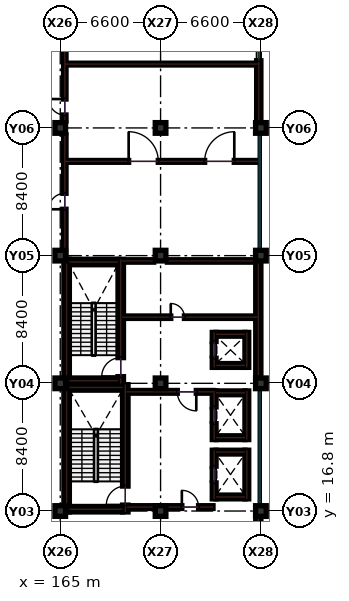
"""IFC4 building model, lengths in metres.
Left out: names, types, materials, properties, quantities, classifications, styles, units other than length and angle.
Written with IfcOpenShell. Run it as: python <this file> out.ifc"""

import sys

from ifc_helpers import new_model, si_unit, direction, frame, frame_2d, origin, origin_2d, place, context, subcontext, project, spatial, rectangle, extrude, element, fill, save


model = new_model("IFC4")
c1 = context("Model", 3, precision=1e-05, world=origin(), true_north=direction((0.0, 1.0)))
c2 = subcontext(c1, "Body", "Model", "MODEL_VIEW")
j1 = project(units=[si_unit("LENGTHUNIT", "METRE"), si_unit("PLANEANGLEUNIT", "RADIAN")], contexts=[c1])
p1 = place(None, origin())
s1 = spatial("IfcSite", under=j1, at=p1, CompositionType="ELEMENT")
p2 = place(p1, origin())
s2 = spatial("IfcBuilding", under=s1, at=p2, CompositionType="ELEMENT")
p3 = place(p2, frame((0.0, 0.0, 22.8)))
s3 = spatial("IfcBuildingStorey", under=s2, at=p3, CompositionType="ELEMENT", Elevation=22.8)
for number, where, z_axis, x_axis in (
    (1, (165.0, 16.8, 0.0), (0.0, 0.0, 1.0), (1.0, 0.0, 0.0)),
    (2, (165.0, 25.2, 0.0), (0.0, 0.0, 1.0), (1.0, 0.0, 0.0)),
    (3, (165.0, 33.6, 0.0), (0.0, 0.0, 1.0), (1.0, 0.0, 0.0)),
    (4, (165.0, 42.0, 0.0), (0.0, 0.0, 1.0), (1.0, 0.0, 0.0)),
    (5, (171.6, 16.8, 0.0), (0.0, 0.0, 1.0), (1.0, 0.0, 0.0)),
    (6, (171.6, 25.2, 0.0), (0.0, 0.0, 1.0), (1.0, 0.0, 0.0)),
    (7, (171.6, 33.6, 0.0), (0.0, 0.0, 1.0), (1.0, 0.0, 0.0)),
    (8, (171.6, 42.0, 0.0), (0.0, 0.0, 1.0), (1.0, 0.0, 0.0)),
    (9, (178.2, 16.8, 0.0), (0.0, 0.0, 1.0), (1.0, 0.0, 0.0)),
    (10, (178.2, 25.2, 0.0), (0.0, 0.0, 1.0), (1.0, 0.0, 0.0)),
    (11, (178.2, 33.6, 0.0), (0.0, 0.0, 1.0), (1.0, 0.0, 0.0)),
    (12, (178.2, 42.0, 0.0), (0.0, 0.0, 1.0), (1.0, 0.0, 0.0)),
):
    element("IfcColumn", number, at=place(p3, frame(where, z_axis=z_axis, x_axis=x_axis)), inside=s3, PredefinedType="COLUMN", context=c2, shape_type="SweptSolid", body=[
        extrude(rectangle(XDim=0.7, YDim=0.7, at=origin_2d()), origin(), (0.0, 0.0, 1.0), 4.2),
    ])
p4 = place(p3, frame((165.3, 33.65, 0.0), z_axis=(0.0, 0.0, 1.0), x_axis=(0.0, 1.0, 0.0)))
e13 = element("IfcWall", 13, at=p4, inside=s3, PredefinedType="PARTITIONING", context=c2, shape_type="SweptSolid", body=[
    extrude(rectangle(XDim=7.9, YDim=0.16, at=frame_2d((3.95, 0.0))), origin(), (0.0, 0.0, 1.0), 3.23),
])
p5 = place(p4, frame((3.0, 0.0, 0.0)))
e14 = element("IfcOpeningElement", 14, at=p5, cuts=e13, PredefinedType="OPENING", context=c2, shape_type="SweptSolid", body=[
    extrude(rectangle(XDim=1.05, YDim=2.15, at=frame_2d((0.525, 1.075))), frame((0.0, 0.09, 0.0), z_axis=(0.0, -1.0, 0.0), x_axis=(1.0, 0.0, 0.0)), (0.0, 0.0, 1.0), 0.18),
])
p6 = place(p3, frame((165.3, 42.45, 0.0), z_axis=(0.0, 0.0, 1.0), x_axis=(0.0, 1.0, 0.0)))
e15 = element("IfcWall", 15, at=p6, inside=s3, PredefinedType="PARTITIONING", context=c2, shape_type="SweptSolid", body=[
    extrude(rectangle(XDim=7.5, YDim=0.16, at=frame_2d((3.75, 0.0))), origin(), (0.0, 0.0, 1.0), 3.23),
])
p7 = place(p6, frame((0.4, 0.0, 0.0)))
e16 = element("IfcOpeningElement", 16, at=p7, cuts=e15, PredefinedType="OPENING", context=c2, shape_type="SweptSolid", body=[
    extrude(rectangle(XDim=1.05, YDim=2.15, at=frame_2d((0.525, 1.075))), frame((0.0, 0.09, 0.0), z_axis=(0.0, -1.0, 0.0), x_axis=(1.0, 0.0, 0.0)), (0.0, 0.0, 1.0), 0.18),
])
p8 = place(p6, frame((6.1, 0.0, 0.0)))
e17 = element("IfcOpeningElement", 17, at=p8, cuts=e15, PredefinedType="OPENING", context=c2, shape_type="SweptSolid", body=[
    extrude(rectangle(XDim=1.05, YDim=2.15, at=frame_2d((0.525, 1.075))), frame((0.0, 0.09, 0.0), z_axis=(0.0, -1.0, 0.0), x_axis=(1.0, 0.0, 0.0)), (0.0, 0.0, 1.0), 0.18),
])
p9 = place(p3, frame((165.3, 46.2, 0.0), z_axis=(0.0, 0.0, 1.0), x_axis=(1.0, 0.0, 0.0)))
e18 = element("IfcWall", 18, at=p9, inside=s3, PredefinedType="PARTITIONING", context=c2, shape_type="SweptSolid", body=[
    extrude(rectangle(XDim=12.7, YDim=0.12, at=frame_2d((6.35, 0.0))), origin(), (0.0, 0.0, 1.0), 3.23),
])
p10 = place(p3, frame((165.3, 39.8, 0.0), z_axis=(0.0, 0.0, 1.0), x_axis=(1.0, 0.0, 0.0)))
e19 = element("IfcWall", 19, at=p10, inside=s3, PredefinedType="PARTITIONING", context=c2, shape_type="SweptSolid", body=[
    extrude(rectangle(XDim=12.75, YDim=0.12, at=frame_2d((6.375, 0.0))), origin(), (0.0, 0.0, 1.0), 3.23),
])
p11 = place(p10, frame((4.2, 0.0, 0.0)))
e20 = element("IfcOpeningElement", 20, at=p11, cuts=e19, PredefinedType="OPENING", context=c2, shape_type="SweptSolid", body=[
    extrude(rectangle(XDim=1.95, YDim=2.35, at=frame_2d((0.975, 1.175))), frame((0.0, 0.07, 0.0), z_axis=(0.0, -1.0, 0.0), x_axis=(1.0, 0.0, 0.0)), (0.0, 0.0, 1.0), 0.14),
])
p12 = place(p10, frame((9.2, 0.0, 0.0)))
e21 = element("IfcOpeningElement", 21, at=p12, cuts=e19, PredefinedType="OPENING", context=c2, shape_type="SweptSolid", body=[
    extrude(rectangle(XDim=1.95, YDim=2.35, at=frame_2d((0.975, 1.175))), frame((0.0, 0.07, 0.0), z_axis=(0.0, -1.0, 0.0), x_axis=(1.0, 0.0, 0.0)), (0.0, 0.0, 1.0), 0.14),
])
p13 = place(p3, frame((169.07, 29.55, 0.0), z_axis=(0.0, 0.0, 1.0), x_axis=(1.0, 0.0, 0.0)))
e22 = element("IfcWall", 22, at=p13, inside=s3, PredefinedType="PARTITIONING", context=c2, shape_type="SweptSolid", body=[
    extrude(rectangle(XDim=8.93, YDim=0.16, at=frame_2d((4.465, 0.0))), origin(), (0.0, 0.0, 1.0), 3.23),
])
p14 = place(p13, frame((3.2, 0.0, 0.0)))
e23 = element("IfcOpeningElement", 23, at=p14, cuts=e22, PredefinedType="OPENING", context=c2, shape_type="SweptSolid", body=[
    extrude(rectangle(XDim=0.9, YDim=2.1, at=frame_2d((0.45, 1.05))), frame((0.0, 0.09, 0.0), z_axis=(0.0, -1.0, 0.0), x_axis=(1.0, 0.0, 0.0)), (0.0, 0.0, 1.0), 0.18),
])
p15 = place(p3, frame((169.07, 33.25, 0.0), z_axis=(0.0, 0.0, 1.0), x_axis=(1.0, 0.0, 0.0)))
e24 = element("IfcWall", 24, at=p15, inside=s3, PredefinedType="PARTITIONING", context=c2, shape_type="SweptSolid", body=[
    extrude(rectangle(XDim=2.08, YDim=0.16, at=frame_2d((1.04, 0.0))), origin(), (0.0, 0.0, 1.0), 3.23),
])
p16 = place(p3, frame((172.05, 33.25, 0.0), z_axis=(0.0, 0.0, 1.0), x_axis=(1.0, 0.0, 0.0)))
e25 = element("IfcWall", 25, at=p16, inside=s3, PredefinedType="PARTITIONING", context=c2, shape_type="SweptSolid", body=[
    extrude(rectangle(XDim=5.95, YDim=0.16, at=frame_2d((2.975, 0.0))), origin(), (0.0, 0.0, 1.0), 3.23),
])
for number, where, z_axis, x_axis in (
    (26, (178.03, 8.745, 0.0), (0.0, 0.0, 1.0), (0.0, 1.0, 0.0)),
    (27, (178.03, 25.545, 0.0), (0.0, 0.0, 1.0), (0.0, 1.0, 0.0)),
):
    element("IfcWall", number, at=place(p3, frame(where, z_axis=z_axis, x_axis=x_axis)), inside=s3, PredefinedType="SHEAR", context=c2, shape_type="SweptSolid", body=[
        extrude(rectangle(XDim=7.71, YDim=0.34, at=frame_2d((3.855, 0.0))), origin(), (0.0, 0.0, 1.0), 3.98),
    ])
p17 = place(p3, frame((178.06, 42.345, 0.0), z_axis=(0.0, 0.0, 1.0), x_axis=(0.0, 1.0, 0.0)))
e28 = element("IfcWall", 28, at=p17, inside=s3, PredefinedType="SOLIDWALL", context=c2, shape_type="SweptSolid", body=[
    extrude(rectangle(XDim=7.71, YDim=0.28, at=frame_2d((3.855, 0.0))), origin(), (0.0, 0.0, 1.0), 3.415),
])
p18 = place(p17, frame((4.075, 0.0, 0.95)))
e29 = element("IfcOpeningElement", 29, at=p18, cuts=e28, PredefinedType="OPENING", context=c2, shape_type="SweptSolid", body=[
    extrude(rectangle(XDim=1.8, YDim=1.6, at=frame_2d((0.9, 0.8))), frame((0.0, 0.15, 0.0), z_axis=(0.0, -1.0, 0.0), x_axis=(1.0, 0.0, 0.0)), (0.0, 0.0, 1.0), 0.3),
])
p19 = place(p3, frame((165.42, 16.74, 0.0), z_axis=(0.0, 0.0, 1.0), x_axis=(0.0, 1.0, 0.0)))
e30 = element("IfcWall", 30, at=p19, inside=s3, PredefinedType="SHEAR", context=c2, shape_type="SweptSolid", body=[
    extrude(rectangle(XDim=8.37, YDim=0.36, at=frame_2d((4.185, 0.0))), origin(), (0.0, 0.0, 1.0), 3.98),
])
p20 = place(p3, frame((169.28, 16.74, 0.0), z_axis=(0.0, 0.0, 1.0), x_axis=(0.0, 1.0, 0.0)))
e31 = element("IfcWall", 31, at=p20, inside=s3, PredefinedType="SHEAR", context=c2, shape_type="SweptSolid", body=[
    extrude(rectangle(XDim=8.37, YDim=0.36, at=frame_2d((4.185, 0.0))), origin(), (0.0, 0.0, 1.0), 3.98),
])
p21 = place(p20, frame((0.45, 0.0, 0.0)))
e32 = element("IfcOpeningElement", 32, at=p21, cuts=e31, PredefinedType="OPENING", context=c2, shape_type="SweptSolid", body=[
    extrude(rectangle(XDim=1.25, YDim=2.15, at=frame_2d((0.625, 1.075))), frame((0.0, 0.19, 0.0), z_axis=(0.0, -1.0, 0.0), x_axis=(1.0, 0.0, 0.0)), (0.0, 0.0, 1.0), 0.38),
])
for number, where, z_axis, x_axis in (
    (33, (165.6, 24.93, 0.0), (0.0, 0.0, 1.0), (1.0, 0.0, 0.0)),
    (34, (165.6, 16.92, 0.0), (0.0, 0.0, 1.0), (1.0, 0.0, 0.0)),
):
    element("IfcWall", number, at=place(p3, frame(where, z_axis=z_axis, x_axis=x_axis)), inside=s3, PredefinedType="SHEAR", context=c2, shape_type="SweptSolid", body=[
        extrude(rectangle(XDim=3.5, YDim=0.36, at=frame_2d((1.75, 0.0))), origin(), (0.0, 0.0, 1.0), 3.98),
    ])
p22 = place(p3, frame((165.42, 25.19, 0.0), z_axis=(0.0, 0.0, 1.0), x_axis=(0.0, 1.0, 0.0)))
e35 = element("IfcWall", 35, at=p22, inside=s3, PredefinedType="SHEAR", context=c2, shape_type="SweptSolid", body=[
    extrude(rectangle(XDim=8.17, YDim=0.36, at=frame_2d((4.085, 0.0))), origin(), (0.0, 0.0, 1.0), 3.98),
])
p23 = place(p3, frame((168.98, 25.19, 0.0), z_axis=(0.0, 0.0, 1.0), x_axis=(0.0, 1.0, 0.0)))
e36 = element("IfcWall", 36, at=p23, inside=s3, PredefinedType="SHEAR", context=c2, shape_type="SweptSolid", body=[
    extrude(rectangle(XDim=8.17, YDim=0.36, at=frame_2d((4.085, 0.0))), origin(), (0.0, 0.0, 1.0), 3.98),
])
p24 = place(p23, frame((0.45, 0.0, 0.0)))
e37 = element("IfcOpeningElement", 37, at=p24, cuts=e36, PredefinedType="OPENING", context=c2, shape_type="SweptSolid", body=[
    extrude(rectangle(XDim=1.25, YDim=2.15, at=frame_2d((0.625, 1.075))), frame((0.0, 0.19, 0.0), z_axis=(0.0, -1.0, 0.0), x_axis=(1.0, 0.0, 0.0)), (0.0, 0.0, 1.0), 0.38),
])
for number, where, z_axis, x_axis in (
    (38, (165.6, 33.18, 0.0), (0.0, 0.0, 1.0), (1.0, 0.0, 0.0)),
    (39, (165.6, 25.37, 0.0), (0.0, 0.0, 1.0), (1.0, 0.0, 0.0)),
):
    element("IfcWall", number, at=place(p3, frame(where, z_axis=z_axis, x_axis=x_axis)), inside=s3, PredefinedType="SHEAR", context=c2, shape_type="SweptSolid", body=[
        extrude(rectangle(XDim=3.2, YDim=0.36, at=frame_2d((1.6, 0.0))), origin(), (0.0, 0.0, 1.0), 3.98),
    ])
p25 = place(p3, frame((175.125, 17.6, 0.0), z_axis=(0.0, 0.0, 1.0), x_axis=(0.0, 1.0, 0.0)))
e40 = element("IfcWall", 40, at=p25, inside=s3, PredefinedType="SHEAR", context=c2, shape_type="SweptSolid", body=[
    extrude(rectangle(XDim=3.2, YDim=0.25, at=frame_2d((1.6, 0.0))), origin(), (0.0, 0.0, 1.0), 3.98),
])
p26 = place(p25, frame((1.05, 0.0, 0.0)))
e41 = element("IfcOpeningElement", 41, at=p26, cuts=e40, PredefinedType="OPENING", context=c2, shape_type="SweptSolid", body=[
    extrude(rectangle(XDim=1.1, YDim=2.15, at=frame_2d((0.55, 1.075))), frame((0.0, 0.135, 0.0), z_axis=(0.0, -1.0, 0.0), x_axis=(1.0, 0.0, 0.0)), (0.0, 0.0, 1.0), 0.27),
])
p27 = place(p3, frame((177.275, 17.6, 0.0), z_axis=(0.0, 0.0, 1.0), x_axis=(0.0, 1.0, 0.0)))
e42 = element("IfcWall", 42, at=p27, inside=s3, PredefinedType="SHEAR", context=c2, shape_type="SweptSolid", body=[
    extrude(rectangle(XDim=3.2, YDim=0.25, at=frame_2d((1.6, 0.0))), origin(), (0.0, 0.0, 1.0), 3.98),
])
for number, where, z_axis, x_axis in (
    (43, (175.25, 17.725, 0.0), (0.0, 0.0, 1.0), (1.0, 0.0, 0.0)),
    (44, (175.25, 20.675, 0.0), (0.0, 0.0, 1.0), (1.0, 0.0, 0.0)),
):
    element("IfcWall", number, at=place(p3, frame(where, z_axis=z_axis, x_axis=x_axis)), inside=s3, PredefinedType="SHEAR", context=c2, shape_type="SweptSolid", body=[
        extrude(rectangle(XDim=1.9, YDim=0.25, at=frame_2d((0.95, 0.0))), origin(), (0.0, 0.0, 1.0), 3.98),
    ])
p28 = place(p3, frame((175.125, 21.5, 0.0), z_axis=(0.0, 0.0, 1.0), x_axis=(0.0, 1.0, 0.0)))
e45 = element("IfcWall", 45, at=p28, inside=s3, PredefinedType="SHEAR", context=c2, shape_type="SweptSolid", body=[
    extrude(rectangle(XDim=3.2, YDim=0.25, at=frame_2d((1.6, 0.0))), origin(), (0.0, 0.0, 1.0), 3.98),
])
p29 = place(p28, frame((1.05, 0.0, 0.0)))
e46 = element("IfcOpeningElement", 46, at=p29, cuts=e45, PredefinedType="OPENING", context=c2, shape_type="SweptSolid", body=[
    extrude(rectangle(XDim=1.1, YDim=2.15, at=frame_2d((0.55, 1.075))), frame((0.0, 0.135, 0.0), z_axis=(0.0, -1.0, 0.0), x_axis=(1.0, 0.0, 0.0)), (0.0, 0.0, 1.0), 0.27),
])
p30 = place(p3, frame((177.275, 21.5, 0.0), z_axis=(0.0, 0.0, 1.0), x_axis=(0.0, 1.0, 0.0)))
e47 = element("IfcWall", 47, at=p30, inside=s3, PredefinedType="SHEAR", context=c2, shape_type="SweptSolid", body=[
    extrude(rectangle(XDim=3.2, YDim=0.25, at=frame_2d((1.6, 0.0))), origin(), (0.0, 0.0, 1.0), 3.98),
])
for number, where, z_axis, x_axis in (
    (48, (175.25, 21.625, 0.0), (0.0, 0.0, 1.0), (1.0, 0.0, 0.0)),
    (49, (175.25, 24.575, 0.0), (0.0, 0.0, 1.0), (1.0, 0.0, 0.0)),
):
    element("IfcWall", number, at=place(p3, frame(where, z_axis=z_axis, x_axis=x_axis)), inside=s3, PredefinedType="SHEAR", context=c2, shape_type="SweptSolid", body=[
        extrude(rectangle(XDim=1.9, YDim=0.25, at=frame_2d((0.95, 0.0))), origin(), (0.0, 0.0, 1.0), 3.98),
    ])
p31 = place(p3, frame((175.125, 26.25, 0.0), z_axis=(0.0, 0.0, 1.0), x_axis=(0.0, 1.0, 0.0)))
e50 = element("IfcWall", 50, at=p31, inside=s3, PredefinedType="SHEAR", context=c2, shape_type="SweptSolid", body=[
    extrude(rectangle(XDim=2.3, YDim=0.25, at=frame_2d((1.15, 0.0))), origin(), (0.0, 0.0, 1.0), 3.98),
])
p32 = place(p31, frame((0.6, 0.0, 0.0)))
e51 = element("IfcOpeningElement", 51, at=p32, cuts=e50, PredefinedType="OPENING", context=c2, shape_type="SweptSolid", body=[
    extrude(rectangle(XDim=1.1, YDim=2.15, at=frame_2d((0.55, 1.075))), frame((0.0, 0.135, 0.0), z_axis=(0.0, -1.0, 0.0), x_axis=(1.0, 0.0, 0.0)), (0.0, 0.0, 1.0), 0.27),
])
p33 = place(p3, frame((177.275, 26.25, 0.0), z_axis=(0.0, 0.0, 1.0), x_axis=(0.0, 1.0, 0.0)))
e52 = element("IfcWall", 52, at=p33, inside=s3, PredefinedType="SHEAR", context=c2, shape_type="SweptSolid", body=[
    extrude(rectangle(XDim=2.3, YDim=0.25, at=frame_2d((1.15, 0.0))), origin(), (0.0, 0.0, 1.0), 3.98),
])
for number, where, z_axis, x_axis in (
    (53, (175.25, 26.375, 0.0), (0.0, 0.0, 1.0), (1.0, 0.0, 0.0)),
    (54, (175.25, 28.425, 0.0), (0.0, 0.0, 1.0), (1.0, 0.0, 0.0)),
):
    element("IfcWall", number, at=place(p3, frame(where, z_axis=z_axis, x_axis=x_axis)), inside=s3, PredefinedType="SHEAR", context=c2, shape_type="SweptSolid", body=[
        extrude(rectangle(XDim=1.9, YDim=0.25, at=frame_2d((0.95, 0.0))), origin(), (0.0, 0.0, 1.0), 3.98),
    ])
p34 = place(p3, frame((169.35, 24.64, 0.0), z_axis=(0.0, 0.0, 1.0), x_axis=(1.0, 0.0, 0.0)))
e55 = element("IfcWall", 55, at=p34, inside=s3, PredefinedType="SOLIDWALL", context=c2, shape_type="SweptSolid", body=[
    extrude(rectangle(XDim=5.7, YDim=0.18, at=frame_2d((2.85, 0.0))), origin(), (0.0, 0.0, 1.0), 3.98),
])
p35 = place(p34, frame((3.35, 0.0, 0.0)))
e56 = element("IfcOpeningElement", 56, at=p35, cuts=e55, PredefinedType="OPENING", context=c2, shape_type="SweptSolid", body=[
    extrude(rectangle(XDim=1.25, YDim=2.15, at=frame_2d((0.625, 1.075))), frame((0.0, 0.1, 0.0), z_axis=(0.0, -1.0, 0.0), x_axis=(1.0, 0.0, 0.0)), (0.0, 0.0, 1.0), 0.2),
])
p36 = place(p3, frame((169.35, 17.06, 0.0), z_axis=(0.0, 0.0, 1.0), x_axis=(1.0, 0.0, 0.0)))
e57 = element("IfcWall", 57, at=p36, inside=s3, PredefinedType="SOLIDWALL", context=c2, shape_type="SweptSolid", body=[
    extrude(rectangle(XDim=5.7, YDim=0.18, at=frame_2d((2.85, 0.0))), origin(), (0.0, 0.0, 1.0), 3.315),
])
p37 = place(p36, frame((3.65, 0.0, 0.0)))
e58 = element("IfcOpeningElement", 58, at=p37, cuts=e57, PredefinedType="OPENING", context=c2, shape_type="SweptSolid", body=[
    extrude(rectangle(XDim=1.1, YDim=2.15, at=frame_2d((0.55, 1.075))), frame((0.0, 0.1, 0.0), z_axis=(0.0, -1.0, 0.0), x_axis=(1.0, 0.0, 0.0)), (0.0, 0.0, 1.0), 0.2),
])
p38 = place(p5, origin())
e59 = element("IfcDoor", 59, at=p38, inside=s3, OperationType="SINGLE_SWING_LEFT", PredefinedType="DOOR", context=c2, shape_type="SweptSolid", body=[
    extrude(rectangle(XDim=1.05, YDim=2.15, at=frame_2d((0.525, 1.075))), frame((0.0, 0.025, 0.0), z_axis=(0.0, -1.0, 0.0), x_axis=(1.0, 0.0, 0.0)), (0.0, 0.0, 1.0), 0.05),
])
fill(e14, e59)
p39 = place(p7, origin())
e60 = element("IfcDoor", 60, at=p39, inside=s3, OperationType="SINGLE_SWING_RIGHT", PredefinedType="DOOR", context=c2, shape_type="SweptSolid", body=[
    extrude(rectangle(XDim=1.05, YDim=2.15, at=frame_2d((0.525, 1.075))), frame((0.0, 0.025, 0.0), z_axis=(0.0, -1.0, 0.0), x_axis=(1.0, 0.0, 0.0)), (0.0, 0.0, 1.0), 0.05),
])
fill(e16, e60)
p40 = place(p11, origin())
e61 = element("IfcDoor", 61, at=p40, inside=s3, OperationType="SINGLE_SWING_LEFT", PredefinedType="DOOR", context=c2, shape_type="SweptSolid", body=[
    extrude(rectangle(XDim=1.95, YDim=2.35, at=frame_2d((0.975, 1.175))), frame((0.0, 0.025, 0.0), z_axis=(0.0, -1.0, 0.0), x_axis=(1.0, 0.0, 0.0)), (0.0, 0.0, 1.0), 0.05),
])
fill(e20, e61)
p41 = place(p12, origin())
e62 = element("IfcDoor", 62, at=p41, inside=s3, OperationType="SINGLE_SWING_RIGHT", PredefinedType="DOOR", context=c2, shape_type="SweptSolid", body=[
    extrude(rectangle(XDim=1.95, YDim=2.35, at=frame_2d((0.975, 1.175))), frame((0.0, 0.025, 0.0), z_axis=(0.0, -1.0, 0.0), x_axis=(1.0, 0.0, 0.0)), (0.0, 0.0, 1.0), 0.05),
])
fill(e21, e62)
p42 = place(p14, origin())
e63 = element("IfcDoor", 63, at=p42, inside=s3, OperationType="SINGLE_SWING_LEFT", PredefinedType="DOOR", context=c2, shape_type="SweptSolid", body=[
    extrude(rectangle(XDim=0.9, YDim=2.1, at=frame_2d((0.45, 1.05))), frame((0.0, 0.025, 0.0), z_axis=(0.0, -1.0, 0.0), x_axis=(1.0, 0.0, 0.0)), (0.0, 0.0, 1.0), 0.05),
])
fill(e23, e63)
p43 = place(p18, origin())
e64 = element("IfcWindow", 64, at=p43, inside=s3, PartitioningType="SINGLE_PANEL", PredefinedType="WINDOW", context=c2, shape_type="SweptSolid", body=[
    extrude(rectangle(XDim=1.8, YDim=1.6, at=frame_2d((0.9, 0.8))), frame((0.0, 0.03, 0.0), z_axis=(0.0, -1.0, 0.0), x_axis=(1.0, 0.0, 0.0)), (0.0, 0.0, 1.0), 0.06),
])
fill(e29, e64)
p44 = place(p21, origin())
e65 = element("IfcDoor", 65, at=p44, inside=s3, OperationType="SINGLE_SWING_LEFT", PredefinedType="DOOR", context=c2, shape_type="SweptSolid", body=[
    extrude(rectangle(XDim=1.25, YDim=2.15, at=frame_2d((0.625, 1.075))), frame((0.0, 0.025, 0.0), z_axis=(0.0, -1.0, 0.0), x_axis=(1.0, 0.0, 0.0)), (0.0, 0.0, 1.0), 0.05),
])
fill(e32, e65)
p45 = place(p24, origin())
e66 = element("IfcDoor", 66, at=p45, inside=s3, OperationType="SINGLE_SWING_LEFT", PredefinedType="DOOR", context=c2, shape_type="SweptSolid", body=[
    extrude(rectangle(XDim=1.25, YDim=2.15, at=frame_2d((0.625, 1.075))), frame((0.0, 0.025, 0.0), z_axis=(0.0, -1.0, 0.0), x_axis=(1.0, 0.0, 0.0)), (0.0, 0.0, 1.0), 0.05),
])
fill(e37, e66)
p46 = place(p26, origin())
e67 = element("IfcDoor", 67, at=p46, inside=s3, OperationType="SLIDING_TO_LEFT", PredefinedType="DOOR", context=c2, shape_type="SweptSolid", body=[
    extrude(rectangle(XDim=1.1, YDim=2.15, at=frame_2d((0.55, 1.075))), frame((0.0, 0.025, 0.0), z_axis=(0.0, -1.0, 0.0), x_axis=(1.0, 0.0, 0.0)), (0.0, 0.0, 1.0), 0.05),
])
fill(e41, e67)
p47 = place(p29, origin())
e68 = element("IfcDoor", 68, at=p47, inside=s3, OperationType="SLIDING_TO_LEFT", PredefinedType="DOOR", context=c2, shape_type="SweptSolid", body=[
    extrude(rectangle(XDim=1.1, YDim=2.15, at=frame_2d((0.55, 1.075))), frame((0.0, 0.025, 0.0), z_axis=(0.0, -1.0, 0.0), x_axis=(1.0, 0.0, 0.0)), (0.0, 0.0, 1.0), 0.05),
])
fill(e46, e68)
p48 = place(p32, origin())
e69 = element("IfcDoor", 69, at=p48, inside=s3, OperationType="SLIDING_TO_LEFT", PredefinedType="DOOR", context=c2, shape_type="SweptSolid", body=[
    extrude(rectangle(XDim=1.1, YDim=2.15, at=frame_2d((0.55, 1.075))), frame((0.0, 0.025, 0.0), z_axis=(0.0, -1.0, 0.0), x_axis=(1.0, 0.0, 0.0)), (0.0, 0.0, 1.0), 0.05),
])
fill(e51, e69)
p49 = place(p35, frame((1.25, 0.0, 0.0), z_axis=(0.0, 0.0, 1.0), x_axis=(-1.0, 0.0, 0.0)))
e70 = element("IfcDoor", 70, at=p49, inside=s3, OperationType="SINGLE_SWING_RIGHT", PredefinedType="DOOR", context=c2, shape_type="SweptSolid", body=[
    extrude(rectangle(XDim=1.25, YDim=2.15, at=frame_2d((0.625, 1.075))), frame((0.0, 0.025, 0.0), z_axis=(0.0, -1.0, 0.0), x_axis=(1.0, 0.0, 0.0)), (0.0, 0.0, 1.0), 0.05),
])
fill(e56, e70)
p50 = place(p37, origin())
e71 = element("IfcDoor", 71, at=p50, inside=s3, OperationType="SINGLE_SWING_LEFT", PredefinedType="DOOR", context=c2, shape_type="SweptSolid", body=[
    extrude(rectangle(XDim=1.1, YDim=2.15, at=frame_2d((0.55, 1.075))), frame((0.0, 0.025, 0.0), z_axis=(0.0, -1.0, 0.0), x_axis=(1.0, 0.0, 0.0)), (0.0, 0.0, 1.0), 0.05),
])
fill(e58, e71)
save(model, sys.argv[1])
